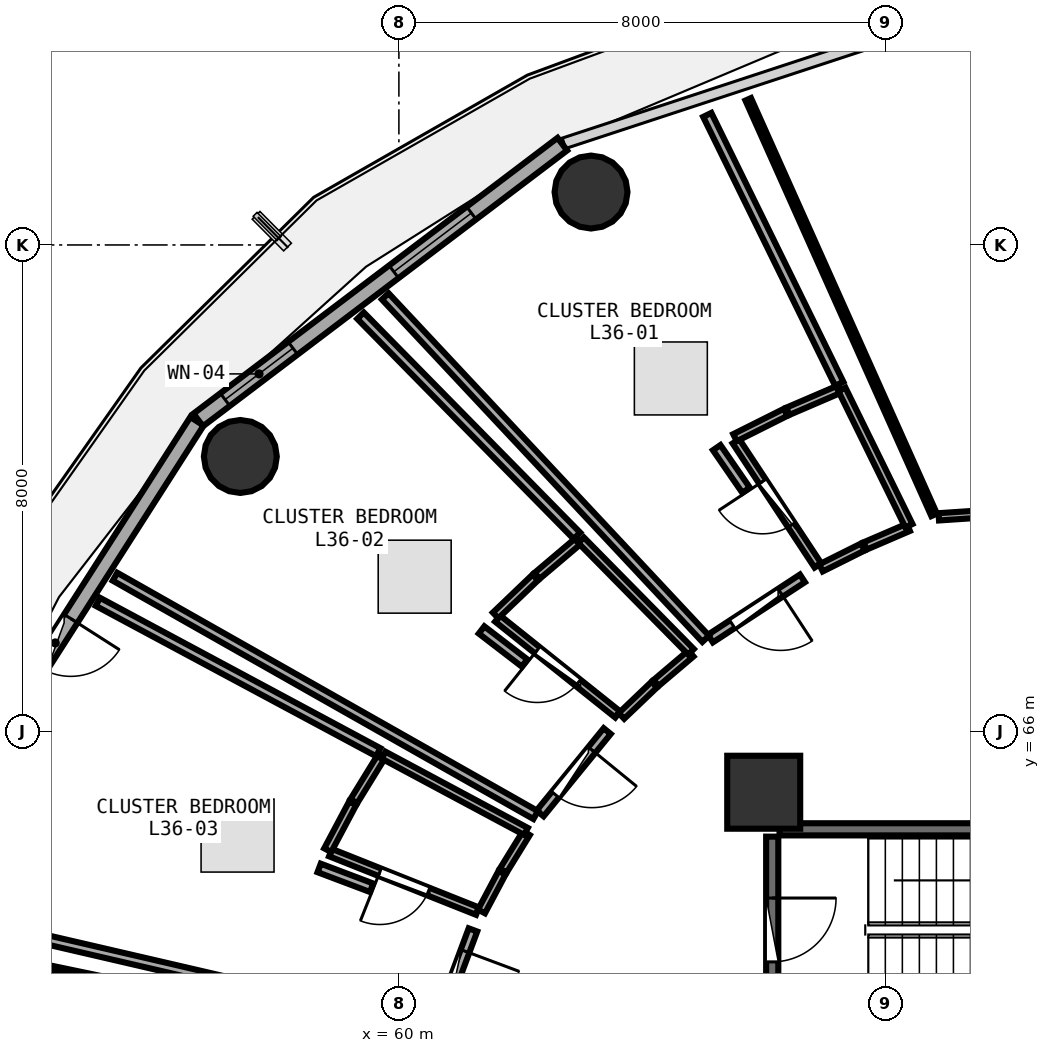
"""IFC4 building model, lengths in metres.
Left out: names, types, materials, properties, quantities, classifications, styles, units other than length and angle.
Written with IfcOpenShell. Run it as: python <this file> out.ifc"""

import sys

from ifc_helpers import new_model, si_unit, direction, frame, frame_2d, origin, origin_2d, place, context, subcontext, project, spatial, rectangle, circle, extrude, element, fill, save


model = new_model("IFC4")
c1 = context("Model", 3, precision=1e-05, world=origin(), true_north=direction((0.0, 1.0)))
c2 = subcontext(c1, "Body", "Model", "MODEL_VIEW")
j1 = project(units=[si_unit("LENGTHUNIT", "METRE"), si_unit("PLANEANGLEUNIT", "RADIAN")], contexts=[c1])
p1 = place(None, origin())
s1 = spatial("IfcSite", under=j1, at=p1, CompositionType="ELEMENT")
p2 = place(p1, origin())
s2 = spatial("IfcBuilding", under=s1, at=p2, CompositionType="ELEMENT")
p3 = place(p2, frame((0.0, 0.0, 143.1)))
s3 = spatial("IfcBuildingStorey", under=s2, at=p3, CompositionType="ELEMENT", Elevation=143.1)
p4 = place(p3, frame((66.0, 65.0, 0.0), z_axis=(0.0, 0.0, 1.0), x_axis=(1.0, 0.0, 0.0)))
e1 = element("IfcColumn", 1, at=p4, inside=s3, PredefinedType="PILASTER", context=c2, shape_type="SweptSolid", body=[
    extrude(rectangle(XDim=1.2, YDim=1.2, at=origin_2d()), origin(), (0.0, 0.0, 1.0), 3.75),
])
for number, where, z_axis, x_axis in (
    (2, (63.16, 74.87, 0.0), (0.0, 0.0, 1.0), (1.0, 0.0, 0.0)),
    (3, (57.392, 70.521, 0.0), (0.0, 0.0, 1.0), (1.0, 0.0, 0.0)),
):
    element("IfcColumn", number, at=place(p3, frame(where, z_axis=z_axis, x_axis=x_axis)), inside=s3, PredefinedType="COLUMN", context=c2, shape_type="SweptSolid", body=[
        extrude(circle(Radius=0.6, at=origin_2d()), origin(), (0.0, 0.0, 1.0), 3.75),
    ])
p5 = place(p3, frame((62.688, 75.658, 0.0), z_axis=(0.0, 0.0, 1.0), x_axis=(-0.797163719609, -0.603763202042, 0.0)))
e4 = element("IfcWall", 4, at=p5, inside=s3, PredefinedType="SOLIDWALL", context=c2, shape_type="SweptSolid", body=[
    extrude(rectangle(XDim=7.512, YDim=0.26, at=frame_2d((3.756, 0.0))), origin(), (0.0, 0.0, 1.0), 3.475),
])
p6 = place(p5, frame((1.876, 0.0, 0.85)))
e5 = element("IfcOpeningElement", 5, at=p6, cuts=e4, PredefinedType="OPENING", context=c2, shape_type="SweptSolid", body=[
    extrude(rectangle(XDim=1.6, YDim=1.45, at=frame_2d((0.8, 0.725))), frame((0.0, 0.14, 0.0), z_axis=(0.0, -1.0, 0.0), x_axis=(1.0, 0.0, 0.0)), (0.0, 0.0, 1.0), 0.28),
])
p7 = place(p5, frame((5.558, 0.0, 0.85)))
e6 = element("IfcOpeningElement", 6, at=p7, cuts=e4, PredefinedType="OPENING", context=c2, shape_type="SweptSolid", body=[
    extrude(rectangle(XDim=1.4, YDim=1.45, at=frame_2d((0.7, 0.725))), frame((0.0, 0.14, 0.0), z_axis=(0.0, -1.0, 0.0), x_axis=(1.0, 0.0, 0.0)), (0.0, 0.0, 1.0), 0.28),
])
p8 = place(p3, frame((56.679, 71.1, 0.0), z_axis=(0.0, 0.0, 1.0), x_axis=(-0.538801521808, -0.842432739213, 0.0)))
e7 = element("IfcWall", 7, at=p8, inside=s3, PredefinedType="SOLIDWALL", context=c2, shape_type="SweptSolid", body=[
    extrude(rectangle(XDim=7.253, YDim=0.26, at=frame_2d((3.627, 0.0))), origin(), (0.0, 0.0, 1.0), 3.475),
])
p9 = place(p8, frame((3.852, 0.0, 0.0)))
e8 = element("IfcOpeningElement", 8, at=p9, cuts=e7, PredefinedType="OPENING", context=c2, shape_type="SweptSolid", body=[
    extrude(rectangle(XDim=0.95, YDim=2.1, at=frame_2d((0.475, 1.05))), frame((0.0, 0.14, 0.0), z_axis=(0.0, -1.0, 0.0), x_axis=(1.0, 0.0, 0.0)), (0.0, 0.0, 1.0), 0.28),
])
p10 = place(p8, frame((5.152, 0.0, 0.85)))
e9 = element("IfcOpeningElement", 9, at=p10, cuts=e7, PredefinedType="OPENING", context=c2, shape_type="SweptSolid", body=[
    extrude(rectangle(XDim=1.2, YDim=1.45, at=frame_2d((0.6, 0.725))), frame((0.0, 0.14, 0.0), z_axis=(0.0, -1.0, 0.0), x_axis=(1.0, 0.0, 0.0)), (0.0, 0.0, 1.0), 0.28),
])
p11 = place(p3, frame((73.42, 64.39, 0.0), z_axis=(0.0, 0.0, 1.0), x_axis=(-1.0, 0.0, 0.0)))
e10 = element("IfcWall", 10, at=p11, inside=s3, PredefinedType="SHEAR", context=c2, shape_type="SweptSolid", body=[
    extrude(rectangle(XDim=7.16, YDim=0.2, at=frame_2d((3.58, 0.0))), origin(), (0.0, 0.0, 1.0), 3.49),
])
p12 = place(p3, frame((66.14, 64.27, 0.0), z_axis=(0.0, 0.0, 1.0), x_axis=(0.0, -1.0, 0.0)))
e11 = element("IfcWall", 11, at=p12, inside=s3, PredefinedType="SHEAR", context=c2, shape_type="SweptSolid", body=[
    extrude(rectangle(XDim=3.07, YDim=0.2, at=frame_2d((1.535, 0.0))), origin(), (0.0, 0.0, 1.0), 3.49),
])
p13 = place(p12, frame((1.01, 0.0, 0.0)))
e12 = element("IfcOpeningElement", 12, at=p13, cuts=e11, PredefinedType="OPENING", context=c2, shape_type="SweptSolid", body=[
    extrude(rectangle(XDim=1.05, YDim=2.1, at=frame_2d((0.525, 1.05))), frame((0.0, 0.11, 0.0), z_axis=(0.0, -1.0, 0.0), x_axis=(1.0, 0.0, 0.0)), (0.0, 0.0, 1.0), 0.22),
])
p14 = place(p3, frame((77.169, 70.083, 0.0), z_axis=(0.0, 0.0, 1.0), x_axis=(-0.997775005058, -0.066671127793, 0.0)))
e13 = element("IfcWall", 13, at=p14, inside=s3, PredefinedType="PARTITIONING", context=c2, shape_type="SweptSolid", body=[
    extrude(rectangle(XDim=8.309, YDim=0.12, at=frame_2d((4.154, 0.0))), origin(), (0.0, 0.0, 1.0), 2.975),
])
p15 = place(p14, frame((3.704, 0.0, 0.0)))
e14 = element("IfcOpeningElement", 14, at=p15, cuts=e13, PredefinedType="OPENING", context=c2, shape_type="SweptSolid", body=[
    extrude(rectangle(XDim=0.9, YDim=2.08, at=frame_2d((0.45, 1.04))), frame((0.0, 0.07, 0.0), z_axis=(0.0, -1.0, 0.0), x_axis=(1.0, 0.0, 0.0)), (0.0, 0.0, 1.0), 0.14),
])
p16 = place(p3, frame((66.891, 68.73, 0.0), z_axis=(0.0, 0.0, 1.0), x_axis=(-0.550825526042, 0.834620416633, 0.0)))
e15 = element("IfcWall", 15, at=p16, inside=s3, PredefinedType="PLUMBINGWALL", context=c2, shape_type="SweptSolid", body=[
    extrude(rectangle(XDim=2.447, YDim=0.13, at=frame_2d((1.223, 0.0))), origin(), (0.0, 0.0, 1.0), 3.235),
])
p17 = place(p16, frame((0.793, 0.0, 0.0)))
e16 = element("IfcOpeningElement", 16, at=p17, cuts=e15, PredefinedType="OPENING", context=c2, shape_type="SweptSolid", body=[
    extrude(rectangle(XDim=0.86, YDim=2.05, at=frame_2d((0.43, 1.025))), frame((0.0, 0.075, 0.0), z_axis=(0.0, -1.0, 0.0), x_axis=(1.0, 0.0, 0.0)), (0.0, 0.0, 1.0), 0.15),
])
p18 = place(p3, frame((66.637, 68.517, 0.0), z_axis=(0.0, 0.0, 1.0), x_axis=(-0.836795974783, -0.547514836864, 0.0)))
e17 = element("IfcWall", 17, at=p18, inside=s3, PredefinedType="PARTITIONING", context=c2, shape_type="SweptSolid", body=[
    extrude(rectangle(XDim=1.809, YDim=0.15, at=frame_2d((0.904, 0.0))), origin(), (0.0, 0.0, 1.0), 2.975),
])
p19 = place(p18, frame((0.429, 0.0, 0.0)))
e18 = element("IfcOpeningElement", 18, at=p19, cuts=e17, PredefinedType="OPENING", context=c2, shape_type="SweptSolid", body=[
    extrude(rectangle(XDim=0.95, YDim=2.08, at=frame_2d((0.475, 1.04))), frame((0.0, 0.085, 0.0), z_axis=(0.0, -1.0, 0.0), x_axis=(1.0, 0.0, 0.0)), (0.0, 0.0, 1.0), 0.17),
])
p20 = place(p3, frame((63.599, 66.278, 0.0), z_axis=(0.0, 0.0, 1.0), x_axis=(-0.781386491078, 0.624047395284, 0.0)))
e19 = element("IfcWall", 19, at=p20, inside=s3, PredefinedType="PLUMBINGWALL", context=c2, shape_type="SweptSolid", body=[
    extrude(rectangle(XDim=2.529, YDim=0.13, at=frame_2d((1.265, 0.0))), origin(), (0.0, 0.0, 1.0), 2.975),
])
p21 = place(p20, frame((0.835, 0.0, 0.0)))
e20 = element("IfcOpeningElement", 20, at=p21, cuts=e19, PredefinedType="OPENING", context=c2, shape_type="SweptSolid", body=[
    extrude(rectangle(XDim=0.86, YDim=2.05, at=frame_2d((0.43, 1.025))), frame((0.0, 0.075, 0.0), z_axis=(0.0, -1.0, 0.0), x_axis=(1.0, 0.0, 0.0)), (0.0, 0.0, 1.0), 0.15),
])
p22 = place(p3, frame((63.426, 66.006, 0.0), z_axis=(0.0, 0.0, 1.0), x_axis=(-0.63192798372, -0.775027111391, 0.0)))
e21 = element("IfcWall", 21, at=p22, inside=s3, PredefinedType="PARTITIONING", context=c2, shape_type="SweptSolid", body=[
    extrude(rectangle(XDim=1.747, YDim=0.15, at=frame_2d((0.874, 0.0))), origin(), (0.0, 0.0, 1.0), 2.975),
])
p23 = place(p22, frame((0.399, 0.0, 0.0)))
e22 = element("IfcOpeningElement", 22, at=p23, cuts=e21, PredefinedType="OPENING", context=c2, shape_type="SweptSolid", body=[
    extrude(rectangle(XDim=0.95, YDim=2.08, at=frame_2d((0.475, 1.04))), frame((0.0, 0.085, 0.0), z_axis=(0.0, -1.0, 0.0), x_axis=(1.0, 0.0, 0.0)), (0.0, 0.0, 1.0), 0.17),
])
p24 = place(p3, frame((61.293, 63.044, 0.0), z_axis=(0.0, 0.0, 1.0), x_axis=(-0.929051463741, 0.369950507123, 0.0)))
e23 = element("IfcWall", 23, at=p24, inside=s3, PredefinedType="PLUMBINGWALL", context=c2, shape_type="SweptSolid", body=[
    extrude(rectangle(XDim=2.602, YDim=0.13, at=frame_2d((1.301, 0.0))), origin(), (0.0, 0.0, 1.0), 3.235),
])
p25 = place(p24, frame((0.871, 0.0, 0.0)))
e24 = element("IfcOpeningElement", 24, at=p25, cuts=e23, PredefinedType="OPENING", context=c2, shape_type="SweptSolid", body=[
    extrude(rectangle(XDim=0.86, YDim=2.05, at=frame_2d((0.43, 1.025))), frame((0.0, 0.075, 0.0), z_axis=(0.0, -1.0, 0.0), x_axis=(1.0, 0.0, 0.0)), (0.0, 0.0, 1.0), 0.15),
])
p26 = place(p3, frame((61.218, 62.736, 0.0), z_axis=(0.0, 0.0, 1.0), x_axis=(-0.349718783302, -0.93685472332, 0.0)))
e25 = element("IfcWall", 25, at=p26, inside=s3, PredefinedType="PARTITIONING", context=c2, shape_type="SweptSolid", body=[
    extrude(rectangle(XDim=1.696, YDim=0.15, at=frame_2d((0.848, 0.0))), origin(), (0.0, 0.0, 1.0), 3.235),
])
p27 = place(p26, frame((0.373, 0.0, 0.0)))
e26 = element("IfcOpeningElement", 26, at=p27, cuts=e25, PredefinedType="OPENING", context=c2, shape_type="SweptSolid", body=[
    extrude(rectangle(XDim=0.95, YDim=2.08, at=frame_2d((0.475, 1.04))), frame((0.0, 0.085, 0.0), z_axis=(0.0, -1.0, 0.0), x_axis=(1.0, 0.0, 0.0)), (0.0, 0.0, 1.0), 0.17),
])
p28 = place(p3, frame((68.803, 69.562, 0.0), z_axis=(0.0, 0.0, 1.0), x_axis=(-0.408373210504, 0.912815052978, 0.0)))
e27 = element("IfcWall", 27, at=p28, inside=s3, PredefinedType="PARTITIONING", context=c2, shape_type="SweptSolid", body=[
    extrude(rectangle(XDim=7.487, YDim=0.1, at=frame_2d((3.743, 0.0))), origin(), (0.0, 0.0, 1.0), 3.025),
])
p29 = place(p3, frame((68.379, 69.356, 0.0), z_axis=(0.0, 0.0, 1.0), x_axis=(-0.918393228723, -0.395668898746, 0.0)))
e28 = element("IfcWall", 28, at=p29, inside=s3, PredefinedType="PLUMBINGWALL", context=c2, shape_type="SweptSolid", body=[
    extrude(rectangle(XDim=0.774, YDim=0.13, at=frame_2d((0.387, 0.0))), origin(), (0.0, 0.0, 1.0), 3.235),
])
p30 = place(p3, frame((67.631, 69.033, 0.0), z_axis=(0.0, 0.0, 1.0), x_axis=(-0.894617251975, -0.446833271443, 0.0)))
e29 = element("IfcWall", 29, at=p30, inside=s3, PredefinedType="PLUMBINGWALL", context=c2, shape_type="SweptSolid", body=[
    extrude(rectangle(XDim=0.771, YDim=0.13, at=frame_2d((0.385, 0.0))), origin(), (0.0, 0.0, 1.0), 3.235),
])
p31 = place(p3, frame((65.528, 70.831, 0.0), z_axis=(0.0, 0.0, 1.0), x_axis=(0.894269924497, 0.447527990343, 0.0)))
e30 = element("IfcWall", 30, at=p31, inside=s3, PredefinedType="PLUMBINGWALL", context=c2, shape_type="SweptSolid", body=[
    extrude(rectangle(XDim=0.932, YDim=0.13, at=frame_2d((0.466, 0.0))), origin(), (0.0, 0.0, 1.0), 3.175),
])
p32 = place(p3, frame((66.397, 71.265, 0.0), z_axis=(0.0, 0.0, 1.0), x_axis=(0.918726840833, 0.394893646357, 0.0)))
e31 = element("IfcWall", 31, at=p32, inside=s3, PredefinedType="PLUMBINGWALL", context=c2, shape_type="SweptSolid", body=[
    extrude(rectangle(XDim=0.937, YDim=0.13, at=frame_2d((0.469, 0.0))), origin(), (0.0, 0.0, 1.0), 3.175),
])
p33 = place(p3, frame((67.286, 71.625, 0.0), z_axis=(0.0, 0.0, 1.0), x_axis=(0.441029506653, -0.897492604015, 0.0)))
e32 = element("IfcWall", 32, at=p33, inside=s3, PredefinedType="PLUMBINGWALL", context=c2, shape_type="SweptSolid", body=[
    extrude(rectangle(XDim=2.499, YDim=0.13, at=frame_2d((1.25, 0.0))), origin(), (0.0, 0.0, 1.0), 3.175),
])
p34 = place(p3, frame((65.046, 67.523, 0.0), z_axis=(0.0, 0.0, 1.0), x_axis=(-0.683295427563, 0.730142012674, 0.0)))
e33 = element("IfcWall", 33, at=p34, inside=s3, PredefinedType="PARTITIONING", context=c2, shape_type="SweptSolid", body=[
    extrude(rectangle(XDim=7.713, YDim=0.15, at=frame_2d((3.856, 0.0))), origin(), (0.0, 0.0, 1.0), 3.025),
])
p35 = place(p3, frame((65.072, 76.139, 0.0), z_axis=(0.0, 0.0, 1.0), x_axis=(0.440581721025, -0.897712508044, 0.0)))
e34 = element("IfcWall", 34, at=p35, inside=s3, PredefinedType="PARTITIONING", context=c2, shape_type="SweptSolid", body=[
    extrude(rectangle(XDim=4.927, YDim=0.15, at=frame_2d((2.464, 0.0))), origin(), (0.0, 0.0, 1.0), 3.025),
])
p36 = place(p3, frame((65.227, 70.667, 0.0), z_axis=(0.0, 0.0, 1.0), x_axis=(0.567880544382, -0.823110981164, 0.0)))
e35 = element("IfcWall", 35, at=p36, inside=s3, PredefinedType="PARTITIONING", context=c2, shape_type="SweptSolid", body=[
    extrude(rectangle(XDim=0.85, YDim=0.15, at=frame_2d((0.425, 0.0))), origin(), (0.0, 0.0, 1.0), 3.48),
])
p37 = place(p3, frame((64.803, 67.282, 0.0), z_axis=(0.0, 0.0, 1.0), x_axis=(-0.762941836055, -0.646467133578, 0.0)))
e36 = element("IfcWall", 36, at=p37, inside=s3, PredefinedType="PLUMBINGWALL", context=c2, shape_type="SweptSolid", body=[
    extrude(rectangle(XDim=0.75, YDim=0.13, at=frame_2d((0.375, 0.0))), origin(), (0.0, 0.0, 1.0), 3.48),
])
p38 = place(p3, frame((64.2, 66.77, 0.0), z_axis=(0.0, 0.0, 1.0), x_axis=(-0.723429788657, -0.690397958343, 0.0)))
e37 = element("IfcWall", 37, at=p38, inside=s3, PredefinedType="PLUMBINGWALL", context=c2, shape_type="SweptSolid", body=[
    extrude(rectangle(XDim=0.747, YDim=0.13, at=frame_2d((0.373, 0.0))), origin(), (0.0, 0.0, 1.0), 2.975),
])
p39 = place(p3, frame((61.591, 67.908, 0.0), z_axis=(0.0, 0.0, 1.0), x_axis=(0.722606643047, 0.691259458831, 0.0)))
e38 = element("IfcWall", 38, at=p39, inside=s3, PredefinedType="PLUMBINGWALL", context=c2, shape_type="SweptSolid", body=[
    extrude(rectangle(XDim=0.903, YDim=0.13, at=frame_2d((0.452, 0.0))), origin(), (0.0, 0.0, 1.0), 2.975),
])
p40 = place(p3, frame((62.273, 68.559, 0.0), z_axis=(0.0, 0.0, 1.0), x_axis=(0.763243602663, 0.646110828724, 0.0)))
e39 = element("IfcWall", 39, at=p40, inside=s3, PredefinedType="PLUMBINGWALL", context=c2, shape_type="SweptSolid", body=[
    extrude(rectangle(XDim=0.909, YDim=0.13, at=frame_2d((0.454, 0.0))), origin(), (0.0, 0.0, 1.0), 3.48),
])
p41 = place(p3, frame((62.996, 69.145, 0.0), z_axis=(0.0, 0.0, 1.0), x_axis=(0.701684931383, -0.712487373271, 0.0)))
e40 = element("IfcWall", 40, at=p41, inside=s3, PredefinedType="PLUMBINGWALL", context=c2, shape_type="SweptSolid", body=[
    extrude(rectangle(XDim=2.576, YDim=0.13, at=frame_2d((1.288, 0.0))), origin(), (0.0, 0.0, 1.0), 3.235),
])
p42 = place(p3, frame((62.249, 64.625, 0.0), z_axis=(0.0, 0.0, 1.0), x_axis=(-0.870077493263, 0.492914957896, 0.0)))
e41 = element("IfcWall", 41, at=p42, inside=s3, PredefinedType="PARTITIONING", context=c2, shape_type="SweptSolid", body=[
    extrude(rectangle(XDim=7.952, YDim=0.15, at=frame_2d((3.976, 0.0))), origin(), (0.0, 0.0, 1.0), 2.975),
])
p43 = place(p3, frame((59.369, 72.837, 0.0), z_axis=(0.0, 0.0, 1.0), x_axis=(0.701093902079, -0.713068959125, 0.0)))
e42 = element("IfcWall", 42, at=p43, inside=s3, PredefinedType="PARTITIONING", context=c2, shape_type="SweptSolid", body=[
    extrude(rectangle(XDim=5.076, YDim=0.15, at=frame_2d((2.538, 0.0))), origin(), (0.0, 0.0, 1.0), 3.025),
])
p44 = place(p3, frame((61.36, 67.669, 0.0), z_axis=(0.0, 0.0, 1.0), x_axis=(0.793020417561, -0.609195056884, 0.0)))
e43 = element("IfcWall", 43, at=p44, inside=s3, PredefinedType="PARTITIONING", context=c2, shape_type="SweptSolid", body=[
    extrude(rectangle(XDim=0.893, YDim=0.15, at=frame_2d((0.446, 0.0))), origin(), (0.0, 0.0, 1.0), 3.48),
])
p45 = place(p3, frame((62.097, 64.329, 0.0), z_axis=(0.0, 0.0, 1.0), x_axis=(-0.524547607878, -0.851381117402, 0.0)))
e44 = element("IfcWall", 44, at=p45, inside=s3, PredefinedType="PLUMBINGWALL", context=c2, shape_type="SweptSolid", body=[
    extrude(rectangle(XDim=0.726, YDim=0.13, at=frame_2d((0.363, 0.0))), origin(), (0.0, 0.0, 1.0), 3.48),
])
p46 = place(p3, frame((61.697, 63.676, 0.0), z_axis=(0.0, 0.0, 1.0), x_axis=(-0.469163481751, -0.88311133352, 0.0)))
e45 = element("IfcWall", 45, at=p46, inside=s3, PredefinedType="PLUMBINGWALL", context=c2, shape_type="SweptSolid", body=[
    extrude(rectangle(XDim=0.721, YDim=0.13, at=frame_2d((0.36, 0.0))), origin(), (0.0, 0.0, 1.0), 3.48),
])
p47 = place(p3, frame((58.829, 64.047, 0.0), z_axis=(0.0, 0.0, 1.0), x_axis=(0.469311809042, 0.883032516895, 0.0)))
e46 = element("IfcWall", 46, at=p47, inside=s3, PredefinedType="PLUMBINGWALL", context=c2, shape_type="SweptSolid", body=[
    extrude(rectangle(XDim=0.874, YDim=0.13, at=frame_2d((0.437, 0.0))), origin(), (0.0, 0.0, 1.0), 2.975),
])
p48 = place(p3, frame((59.26, 64.853, 0.0), z_axis=(0.0, 0.0, 1.0), x_axis=(0.524097425664, 0.851658316705, 0.0)))
e47 = element("IfcWall", 47, at=p48, inside=s3, PredefinedType="PLUMBINGWALL", context=c2, shape_type="SweptSolid", body=[
    extrude(rectangle(XDim=0.879, YDim=0.13, at=frame_2d((0.44, 0.0))), origin(), (0.0, 0.0, 1.0), 2.975),
])
p49 = place(p3, frame((59.749, 65.61, 0.0), z_axis=(0.0, 0.0, 1.0), x_axis=(0.881540078275, -0.472109193296, 0.0)))
e48 = element("IfcWall", 48, at=p49, inside=s3, PredefinedType="PLUMBINGWALL", context=c2, shape_type="SweptSolid", body=[
    extrude(rectangle(XDim=2.656, YDim=0.13, at=frame_2d((1.328, 0.0))), origin(), (0.0, 0.0, 1.0), 2.975),
])
p50 = place(p3, frame((60.565, 61.1, 0.0), z_axis=(0.0, 0.0, 1.0), x_axis=(-0.97414388338, 0.225928516292, 0.0)))
e49 = element("IfcWall", 49, at=p50, inside=s3, PredefinedType="PARTITIONING", context=c2, shape_type="SweptSolid", body=[
    extrude(rectangle(XDim=8.122, YDim=0.15, at=frame_2d((4.061, 0.0))), origin(), (0.0, 0.0, 1.0), 3.025),
])
p51 = place(p3, frame((55.049, 68.131, 0.0), z_axis=(0.0, 0.0, 1.0), x_axis=(0.881257916537, -0.472635678447, 0.0)))
e50 = element("IfcWall", 50, at=p51, inside=s3, PredefinedType="PARTITIONING", context=c2, shape_type="SweptSolid", body=[
    extrude(rectangle(XDim=5.233, YDim=0.15, at=frame_2d((2.616, 0.0))), origin(), (0.0, 0.0, 1.0), 3.025),
])
p52 = place(p3, frame((58.688, 63.755, 0.0), z_axis=(0.0, 0.0, 1.0), x_axis=(0.935532386314, -0.353240929336, 0.0)))
e51 = element("IfcWall", 51, at=p52, inside=s3, PredefinedType="PARTITIONING", context=c2, shape_type="SweptSolid", body=[
    extrude(rectangle(XDim=0.922, YDim=0.15, at=frame_2d((0.461, 0.0))), origin(), (0.0, 0.0, 1.0), 3.48),
])
p53 = place(p3, frame((52.525, 62.464, 0.0), z_axis=(0.0, 0.0, 1.0), x_axis=(0.978946183013, -0.204118521367, 0.0)))
e52 = element("IfcWall", 52, at=p53, inside=s3, PredefinedType="PARTITIONING", context=c2, shape_type="SweptSolid", body=[
    extrude(rectangle(XDim=8.131, YDim=0.1, at=frame_2d((4.065, 0.0))), origin(), (0.0, 0.0, 1.0), 3.025),
])
p54 = place(p6, origin())
e53 = element("IfcWindow", 53, at=p54, inside=s3, PartitioningType="SINGLE_PANEL", PredefinedType="WINDOW", context=c2, shape_type="SweptSolid", body=[
    extrude(rectangle(XDim=1.6, YDim=1.45, at=frame_2d((0.8, 0.725))), frame((0.0, 0.03, 0.0), z_axis=(0.0, -1.0, 0.0), x_axis=(1.0, 0.0, 0.0)), (0.0, 0.0, 1.0), 0.06),
])
fill(e5, e53)
p55 = place(p9, frame((0.95, 0.0, 0.0), z_axis=(0.0, 0.0, 1.0), x_axis=(-1.0, 0.0, 0.0)))
e54 = element("IfcDoor", 54, at=p55, inside=s3, OperationType="SINGLE_SWING_RIGHT", PredefinedType="DOOR", context=c2, shape_type="SweptSolid", body=[
    extrude(rectangle(XDim=0.95, YDim=2.1, at=frame_2d((0.475, 1.05))), frame((0.0, 0.025, 0.0), z_axis=(0.0, -1.0, 0.0), x_axis=(1.0, 0.0, 0.0)), (0.0, 0.0, 1.0), 0.05),
])
fill(e8, e54)
p56 = place(p7, origin())
e55 = element("IfcWindow", 55, at=p56, inside=s3, PartitioningType="SINGLE_PANEL", PredefinedType="WINDOW", context=c2, shape_type="SweptSolid", body=[
    extrude(rectangle(XDim=1.4, YDim=1.45, at=frame_2d((0.7, 0.725))), frame((0.0, 0.03, 0.0), z_axis=(0.0, -1.0, 0.0), x_axis=(1.0, 0.0, 0.0)), (0.0, 0.0, 1.0), 0.06),
])
fill(e6, e55)
p57 = place(p13, origin())
e56 = element("IfcDoor", 56, at=p57, inside=s3, OperationType="SINGLE_SWING_LEFT", PredefinedType="DOOR", context=c2, shape_type="SweptSolid", body=[
    extrude(rectangle(XDim=1.05, YDim=2.1, at=frame_2d((0.525, 1.05))), frame((0.0, 0.025, 0.0), z_axis=(0.0, -1.0, 0.0), x_axis=(1.0, 0.0, 0.0)), (0.0, 0.0, 1.0), 0.05),
])
fill(e12, e56)
p58 = place(p17, origin())
e57 = element("IfcDoor", 57, at=p58, inside=s3, OperationType="SINGLE_SWING_RIGHT", PredefinedType="DOOR", context=c2, shape_type="SweptSolid", body=[
    extrude(rectangle(XDim=0.86, YDim=2.05, at=frame_2d((0.43, 1.025))), frame((0.0, 0.025, 0.0), z_axis=(0.0, -1.0, 0.0), x_axis=(1.0, 0.0, 0.0)), (0.0, 0.0, 1.0), 0.05),
])
fill(e16, e57)
p59 = place(p19, origin())
e58 = element("IfcDoor", 58, at=p59, inside=s3, OperationType="SINGLE_SWING_LEFT", PredefinedType="DOOR", context=c2, shape_type="SweptSolid", body=[
    extrude(rectangle(XDim=0.95, YDim=2.08, at=frame_2d((0.475, 1.04))), frame((0.0, 0.025, 0.0), z_axis=(0.0, -1.0, 0.0), x_axis=(1.0, 0.0, 0.0)), (0.0, 0.0, 1.0), 0.05),
])
fill(e18, e58)
p60 = place(p21, origin())
e59 = element("IfcDoor", 59, at=p60, inside=s3, OperationType="SINGLE_SWING_RIGHT", PredefinedType="DOOR", context=c2, shape_type="SweptSolid", body=[
    extrude(rectangle(XDim=0.86, YDim=2.05, at=frame_2d((0.43, 1.025))), frame((0.0, 0.025, 0.0), z_axis=(0.0, -1.0, 0.0), x_axis=(1.0, 0.0, 0.0)), (0.0, 0.0, 1.0), 0.05),
])
fill(e20, e59)
p61 = place(p23, origin())
e60 = element("IfcDoor", 60, at=p61, inside=s3, OperationType="SINGLE_SWING_LEFT", PredefinedType="DOOR", context=c2, shape_type="SweptSolid", body=[
    extrude(rectangle(XDim=0.95, YDim=2.08, at=frame_2d((0.475, 1.04))), frame((0.0, 0.025, 0.0), z_axis=(0.0, -1.0, 0.0), x_axis=(1.0, 0.0, 0.0)), (0.0, 0.0, 1.0), 0.05),
])
fill(e22, e60)
p62 = place(p25, origin())
e61 = element("IfcDoor", 61, at=p62, inside=s3, OperationType="SINGLE_SWING_RIGHT", PredefinedType="DOOR", context=c2, shape_type="SweptSolid", body=[
    extrude(rectangle(XDim=0.86, YDim=2.05, at=frame_2d((0.43, 1.025))), frame((0.0, 0.025, 0.0), z_axis=(0.0, -1.0, 0.0), x_axis=(1.0, 0.0, 0.0)), (0.0, 0.0, 1.0), 0.05),
])
fill(e24, e61)
p63 = place(p27, origin())
e62 = element("IfcDoor", 62, at=p63, inside=s3, OperationType="SINGLE_SWING_LEFT", PredefinedType="DOOR", context=c2, shape_type="SweptSolid", body=[
    extrude(rectangle(XDim=0.95, YDim=2.08, at=frame_2d((0.475, 1.04))), frame((0.0, 0.025, 0.0), z_axis=(0.0, -1.0, 0.0), x_axis=(1.0, 0.0, 0.0)), (0.0, 0.0, 1.0), 0.05),
])
fill(e26, e62)
save(model, sys.argv[1])
